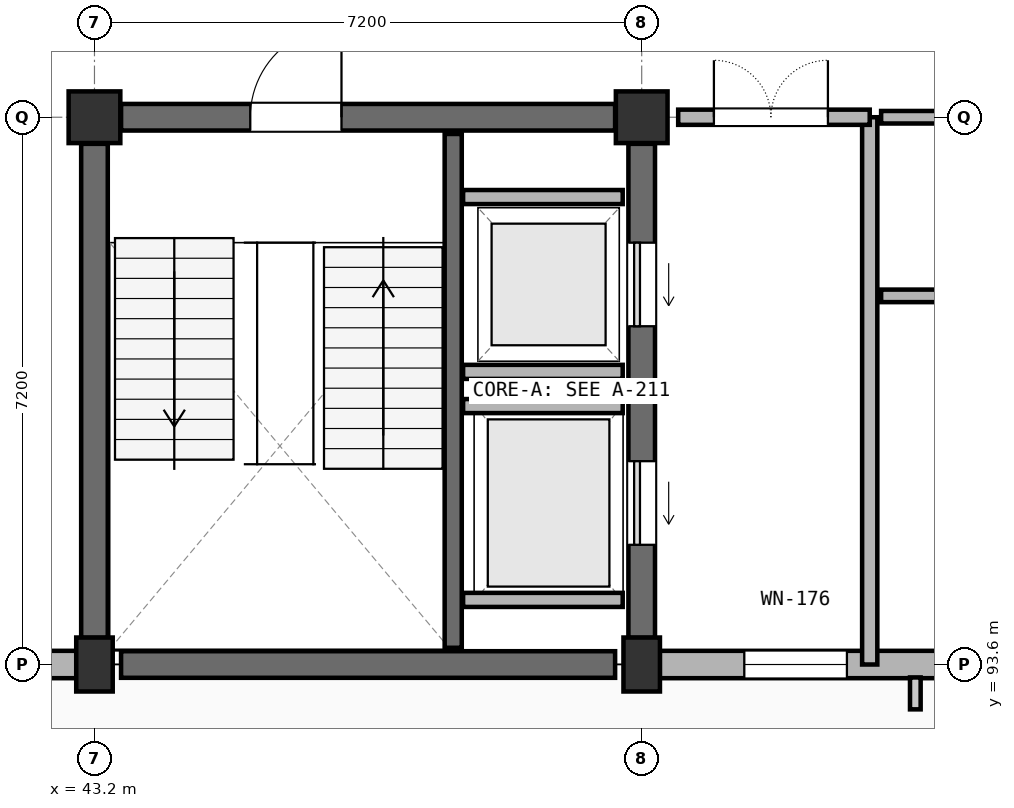
"""IFC4 building model, lengths in metres.
Left out: names, types, materials, properties, quantities, classifications, styles, units other than length and angle.
Written with IfcOpenShell. Run it as: python <this file> out.ifc"""

import sys

from ifc_helpers import new_model, si_unit, direction, frame, frame_2d, origin, origin_2d, place, context, subcontext, project, spatial, rectangle, extrude, element, fill, save


model = new_model("IFC4")
c1 = context("Model", 3, precision=1e-05, world=origin(), true_north=direction((0.0, 1.0)))
c2 = subcontext(c1, "Body", "Model", "MODEL_VIEW")
j1 = project(units=[si_unit("LENGTHUNIT", "METRE"), si_unit("PLANEANGLEUNIT", "RADIAN")], contexts=[c1])
p1 = place(None, origin())
s1 = spatial("IfcSite", under=j1, at=p1, CompositionType="ELEMENT")
p2 = place(p1, origin())
s2 = spatial("IfcBuilding", under=s1, at=p2, CompositionType="ELEMENT")
p3 = place(p2, frame((0.0, 0.0, 22.5)))
s3 = spatial("IfcBuildingStorey", under=s2, at=p3, CompositionType="ELEMENT", Elevation=22.5)
p4 = place(p3, frame((43.2, 93.6, 0.0), z_axis=(0.0, 0.0, 1.0), x_axis=(1.0, 0.0, 0.0)))
e1 = element("IfcColumn", 1, at=p4, inside=s3, PredefinedType="COLUMN", context=c2, shape_type="SweptSolid", body=[
    extrude(rectangle(XDim=0.48, YDim=0.71, at=origin_2d()), origin(), (0.0, 0.0, 1.0), 3.9),
])
p5 = place(p3, frame((43.2, 100.8, 0.0), z_axis=(0.0, 0.0, 1.0), x_axis=(1.0, 0.0, 0.0)))
e2 = element("IfcColumn", 2, at=p5, inside=s3, PredefinedType="COLUMN", context=c2, shape_type="SweptSolid", body=[
    extrude(rectangle(XDim=0.68, YDim=0.68, at=origin_2d()), origin(), (0.0, 0.0, 1.0), 3.9),
])
p6 = place(p3, frame((50.4, 93.6, 0.0), z_axis=(0.0, 0.0, 1.0), x_axis=(1.0, 0.0, 0.0)))
e3 = element("IfcColumn", 3, at=p6, inside=s3, PredefinedType="COLUMN", context=c2, shape_type="SweptSolid", body=[
    extrude(rectangle(XDim=0.48, YDim=0.71, at=origin_2d()), origin(), (0.0, 0.0, 1.0), 3.9),
])
p7 = place(p3, frame((50.4, 100.8, 0.0), z_axis=(0.0, 0.0, 1.0), x_axis=(1.0, 0.0, 0.0)))
e4 = element("IfcColumn", 4, at=p7, inside=s3, PredefinedType="COLUMN", context=c2, shape_type="SweptSolid", body=[
    extrude(rectangle(XDim=0.68, YDim=0.68, at=origin_2d()), origin(), (0.0, 0.0, 1.0), 3.9),
])
p8 = place(p3, frame((43.55, 93.6, 0.0), z_axis=(0.0, 0.0, 1.0), x_axis=(1.0, 0.0, 0.0)))
e5 = element("IfcWall", 5, at=p8, inside=s3, PredefinedType="SHEAR", context=c2, shape_type="SweptSolid", body=[
    extrude(rectangle(XDim=6.5, YDim=0.35, at=frame_2d((3.25, 0.0))), origin(), (0.0, 0.0, 1.0), 3.9),
])
p9 = place(p3, frame((50.4, 93.95, 0.0), z_axis=(0.0, 0.0, 1.0), x_axis=(0.0, 1.0, 0.0)))
e6 = element("IfcWall", 6, at=p9, inside=s3, PredefinedType="SHEAR", context=c2, shape_type="SweptSolid", body=[
    extrude(rectangle(XDim=6.5, YDim=0.35, at=frame_2d((3.25, 0.0))), origin(), (0.0, 0.0, 1.0), 3.9),
])
p10 = place(p9, frame((1.225, 0.0, 0.0)))
e7 = element("IfcOpeningElement", 7, at=p10, cuts=e6, PredefinedType="OPENING", context=c2, shape_type="SweptSolid", body=[
    extrude(rectangle(XDim=1.1, YDim=2.2, at=frame_2d((0.55, 1.1))), frame((0.0, 0.185, 0.0), z_axis=(0.0, -1.0, 0.0), x_axis=(1.0, 0.0, 0.0)), (0.0, 0.0, 1.0), 0.37),
])
p11 = place(p9, frame((4.1, 0.0, 0.0)))
e8 = element("IfcOpeningElement", 8, at=p11, cuts=e6, PredefinedType="OPENING", context=c2, shape_type="SweptSolid", body=[
    extrude(rectangle(XDim=1.1, YDim=2.2, at=frame_2d((0.55, 1.1))), frame((0.0, 0.185, 0.0), z_axis=(0.0, -1.0, 0.0), x_axis=(1.0, 0.0, 0.0)), (0.0, 0.0, 1.0), 0.37),
])
p12 = place(p3, frame((50.05, 100.8, 0.0), z_axis=(0.0, 0.0, 1.0), x_axis=(-1.0, 0.0, 0.0)))
e9 = element("IfcWall", 9, at=p12, inside=s3, PredefinedType="SHEAR", context=c2, shape_type="SweptSolid", body=[
    extrude(rectangle(XDim=6.5, YDim=0.35, at=frame_2d((3.25, 0.0))), origin(), (0.0, 0.0, 1.0), 3.9),
])
p13 = place(p12, frame((3.6, 0.0, 0.0)))
e10 = element("IfcOpeningElement", 10, at=p13, cuts=e9, PredefinedType="OPENING", context=c2, shape_type="SweptSolid", body=[
    extrude(rectangle(XDim=1.2, YDim=2.2, at=frame_2d((0.6, 1.1))), frame((0.0, 0.185, 0.0), z_axis=(0.0, -1.0, 0.0), x_axis=(1.0, 0.0, 0.0)), (0.0, 0.0, 1.0), 0.37),
])
p14 = place(p3, frame((43.2, 100.45, 0.0), z_axis=(0.0, 0.0, 1.0), x_axis=(0.0, -1.0, 0.0)))
e11 = element("IfcWall", 11, at=p14, inside=s3, PredefinedType="SHEAR", context=c2, shape_type="SweptSolid", body=[
    extrude(rectangle(XDim=6.5, YDim=0.35, at=frame_2d((3.25, 0.0))), origin(), (0.0, 0.0, 1.0), 3.9),
])
p15 = place(p3, frame((47.92, 93.82, 0.0), z_axis=(0.0, 0.0, 1.0), x_axis=(0.0, 1.0, 0.0)))
e12 = element("IfcWall", 12, at=p15, inside=s3, PredefinedType="SHEAR", context=c2, shape_type="SweptSolid", body=[
    extrude(rectangle(XDim=6.76, YDim=0.225, at=frame_2d((3.38, 0.0))), origin(), (0.0, 0.0, 1.0), 3.9),
])
for number, where, z_axis, x_axis in (
    (13, (48.05, 94.45, 0.0), (0.0, 0.0, 1.0), (1.0, 0.0, 0.0)),
    (14, (48.05, 97.0, 0.0), (0.0, 0.0, 1.0), (1.0, 0.0, 0.0)),
    (15, (48.05, 97.45, 0.0), (0.0, 0.0, 1.0), (1.0, 0.0, 0.0)),
    (16, (48.05, 99.75, 0.0), (0.0, 0.0, 1.0), (1.0, 0.0, 0.0)),
):
    element("IfcWall", number, at=place(p3, frame(where, z_axis=z_axis, x_axis=x_axis)), inside=s3, PredefinedType="PARTITIONING", context=c2, shape_type="SweptSolid", body=[
        extrude(rectangle(XDim=2.1, YDim=0.185, at=frame_2d((1.05, 0.0))), origin(), (0.0, 0.0, 1.0), 3.9),
    ])
p16 = place(p3, frame((36.238, 93.6, 0.0), z_axis=(0.0, 0.0, 1.0), x_axis=(1.0, 0.0, 0.0)))
e17 = element("IfcWall", 17, at=p16, inside=s3, PredefinedType="SOLIDWALL", context=c2, shape_type="SweptSolid", body=[
    extrude(rectangle(XDim=6.724, YDim=0.36, at=frame_2d((3.362, 0.0))), origin(), (0.0, 0.0, 1.0), 2.74),
])
p17 = place(p16, frame((1.112, 0.0, 0.7)))
e18 = element("IfcOpeningElement", 18, at=p17, cuts=e17, PredefinedType="OPENING", context=c2, shape_type="SweptSolid", body=[
    extrude(rectangle(XDim=1.35, YDim=1.89, at=frame_2d((0.675, 0.945))), frame((0.0, 0.19, 0.0), z_axis=(0.0, -1.0, 0.0), x_axis=(1.0, 0.0, 0.0)), (0.0, 0.0, 1.0), 0.38),
])
p18 = place(p16, frame((4.312, 0.0, 0.7)))
e19 = element("IfcOpeningElement", 19, at=p18, cuts=e17, PredefinedType="OPENING", context=c2, shape_type="SweptSolid", body=[
    extrude(rectangle(XDim=1.05, YDim=1.89, at=frame_2d((0.525, 0.945))), frame((0.0, 0.19, 0.0), z_axis=(0.0, -1.0, 0.0), x_axis=(1.0, 0.0, 0.0)), (0.0, 0.0, 1.0), 0.38),
])
p19 = place(p3, frame((50.638, 93.6, 0.0), z_axis=(0.0, 0.0, 1.0), x_axis=(1.0, 0.0, 0.0)))
e20 = element("IfcWall", 20, at=p19, inside=s3, PredefinedType="SOLIDWALL", context=c2, shape_type="SweptSolid", body=[
    extrude(rectangle(XDim=6.724, YDim=0.36, at=frame_2d((3.362, 0.0))), origin(), (0.0, 0.0, 1.0), 2.74),
])
p20 = place(p19, frame((1.112, 0.0, 0.7)))
e21 = element("IfcOpeningElement", 21, at=p20, cuts=e20, PredefinedType="OPENING", context=c2, shape_type="SweptSolid", body=[
    extrude(rectangle(XDim=1.35, YDim=1.89, at=frame_2d((0.675, 0.945))), frame((0.0, 0.19, 0.0), z_axis=(0.0, -1.0, 0.0), x_axis=(1.0, 0.0, 0.0)), (0.0, 0.0, 1.0), 0.38),
])
p21 = place(p19, frame((4.312, 0.0, 0.7)))
e22 = element("IfcOpeningElement", 22, at=p21, cuts=e20, PredefinedType="OPENING", context=c2, shape_type="SweptSolid", body=[
    extrude(rectangle(XDim=1.05, YDim=1.89, at=frame_2d((0.525, 0.945))), frame((0.0, 0.19, 0.0), z_axis=(0.0, -1.0, 0.0), x_axis=(1.0, 0.0, 0.0)), (0.0, 0.0, 1.0), 0.38),
])
p22 = place(p3, frame((53.4, 93.6, 0.0), z_axis=(0.0, 0.0, 1.0), x_axis=(0.0, 1.0, 0.0)))
e23 = element("IfcWall", 23, at=p22, inside=s3, PredefinedType="PARTITIONING", context=c2, shape_type="SweptSolid", body=[
    extrude(rectangle(XDim=7.2, YDim=0.2, at=frame_2d((3.6, 0.0))), origin(), (0.0, 0.0, 1.0), 2.78),
])
p23 = place(p3, frame((53.4, 100.8, 0.0), z_axis=(0.0, 0.0, 1.0), x_axis=(-1.0, 0.0, 0.0)))
e24 = element("IfcWall", 24, at=p23, inside=s3, PredefinedType="PARTITIONING", context=c2, shape_type="SweptSolid", body=[
    extrude(rectangle(XDim=2.52, YDim=0.2, at=frame_2d((1.26, 0.0))), origin(), (0.0, 0.0, 1.0), 2.78),
])
p24 = place(p23, frame((0.55, 0.0, 0.0)))
e25 = element("IfcOpeningElement", 25, at=p24, cuts=e24, PredefinedType="OPENING", context=c2, shape_type="SweptSolid", body=[
    extrude(rectangle(XDim=1.5, YDim=2.2, at=frame_2d((0.75, 1.1))), frame((0.0, 0.11, 0.0), z_axis=(0.0, -1.0, 0.0), x_axis=(1.0, 0.0, 0.0)), (0.0, 0.0, 1.0), 0.22),
])
p25 = place(p3, frame((56.75, 100.8, 0.0), z_axis=(0.0, 0.0, 1.0), x_axis=(-1.0, 0.0, 0.0)))
e26 = element("IfcWall", 26, at=p25, inside=s3, PredefinedType="PARTITIONING", context=c2, shape_type="SweptSolid", body=[
    extrude(rectangle(XDim=3.2, YDim=0.165, at=frame_2d((1.6, 0.0))), origin(), (0.0, 0.0, 1.0), 2.78),
])
p26 = place(p25, frame((0.95, 0.0, 0.0)))
e27 = element("IfcOpeningElement", 27, at=p26, cuts=e26, PredefinedType="OPENING", context=c2, shape_type="SweptSolid", body=[
    extrude(rectangle(XDim=0.95, YDim=2.15, at=frame_2d((0.475, 1.075))), frame((0.0, 0.093, 0.0), z_axis=(0.0, -1.0, 0.0), x_axis=(1.0, 0.0, 0.0)), (0.0, 0.0, 1.0), 0.185),
])
p27 = place(p3, frame((53.55, 98.45, 0.0), z_axis=(0.0, 0.0, 1.0), x_axis=(1.0, 0.0, 0.0)))
e28 = element("IfcWall", 28, at=p27, inside=s3, PredefinedType="PARTITIONING", context=c2, shape_type="SweptSolid", body=[
    extrude(rectangle(XDim=3.2, YDim=0.165, at=frame_2d((1.6, 0.0))), origin(), (0.0, 0.0, 1.0), 2.78),
])
p28 = place(p10, origin())
e29 = element("IfcDoor", 29, at=p28, inside=s3, OperationType="SLIDING_TO_LEFT", PredefinedType="DOOR", context=c2, shape_type="SweptSolid", body=[
    extrude(rectangle(XDim=1.1, YDim=2.2, at=frame_2d((0.55, 1.1))), frame((0.0, 0.025, 0.0), z_axis=(0.0, -1.0, 0.0), x_axis=(1.0, 0.0, 0.0)), (0.0, 0.0, 1.0), 0.05),
])
fill(e7, e29)
p29 = place(p11, origin())
e30 = element("IfcDoor", 30, at=p29, inside=s3, OperationType="SLIDING_TO_LEFT", PredefinedType="DOOR", context=c2, shape_type="SweptSolid", body=[
    extrude(rectangle(XDim=1.1, YDim=2.2, at=frame_2d((0.55, 1.1))), frame((0.0, 0.025, 0.0), z_axis=(0.0, -1.0, 0.0), x_axis=(1.0, 0.0, 0.0)), (0.0, 0.0, 1.0), 0.05),
])
fill(e8, e30)
p30 = place(p20, origin())
e31 = element("IfcWindow", 31, at=p30, inside=s3, PartitioningType="DOUBLE_PANEL_VERTICAL", PredefinedType="WINDOW", context=c2, shape_type="SweptSolid", body=[
    extrude(rectangle(XDim=1.35, YDim=1.89, at=frame_2d((0.675, 0.945))), frame((0.0, 0.03, 0.0), z_axis=(0.0, -1.0, 0.0), x_axis=(1.0, 0.0, 0.0)), (0.0, 0.0, 1.0), 0.06),
])
fill(e21, e31)
p31 = place(p13, frame((1.2, 0.0, 0.0), z_axis=(0.0, 0.0, 1.0), x_axis=(-1.0, 0.0, 0.0)))
e32 = element("IfcDoor", 32, at=p31, inside=s3, OperationType="SINGLE_SWING_RIGHT", PredefinedType="DOOR", context=c2, shape_type="SweptSolid", body=[
    extrude(rectangle(XDim=1.2, YDim=2.2, at=frame_2d((0.6, 1.1))), frame((0.0, 0.025, 0.0), z_axis=(0.0, -1.0, 0.0), x_axis=(1.0, 0.0, 0.0)), (0.0, 0.0, 1.0), 0.05),
])
fill(e10, e32)
p32 = place(p24, frame((1.5, 0.0, 0.0), z_axis=(0.0, 0.0, 1.0), x_axis=(-1.0, 0.0, 0.0)))
e33 = element("IfcDoor", 33, at=p32, inside=s3, OperationType="DOUBLE_DOOR_SINGLE_SWING", PredefinedType="DOOR", context=c2, shape_type="SweptSolid", body=[
    extrude(rectangle(XDim=1.5, YDim=2.2, at=frame_2d((0.75, 1.1))), frame((0.0, 0.025, 0.0), z_axis=(0.0, -1.0, 0.0), x_axis=(1.0, 0.0, 0.0)), (0.0, 0.0, 1.0), 0.05),
])
fill(e25, e33)
save(model, sys.argv[1])
